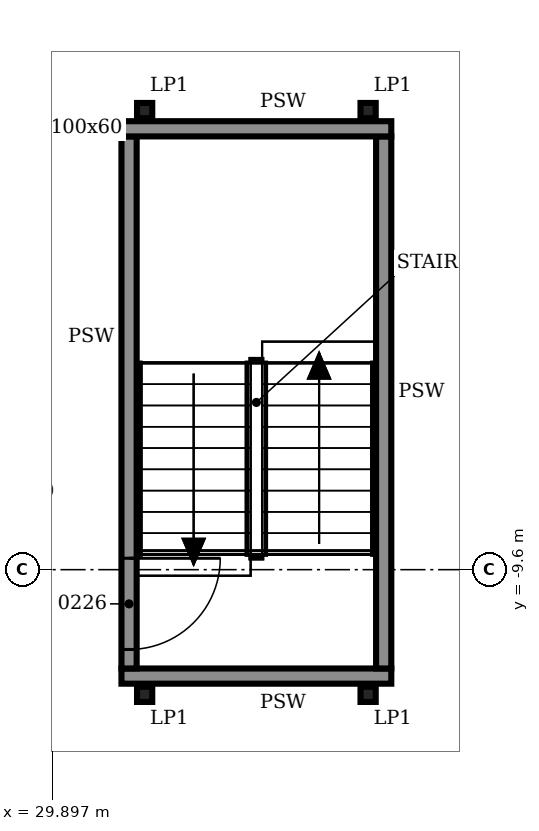
"""IFC4 building model, lengths in metres.
Left out: names, types, materials, properties, quantities, classifications, styles, units other than length and angle.
Written with IfcOpenShell. Run it as: python <this file> out.ifc"""

import sys

from ifc_helpers import new_model, si_unit, direction, frame, frame_2d, origin, origin_2d, place, context, subcontext, project, spatial, rectangle, i_section, extrude, element, fill, save


model = new_model("IFC4")
c1 = context("Model", 3, precision=1e-05, world=origin(), true_north=direction((0.0, 1.0)))
c2 = subcontext(c1, "Body", "Model", "MODEL_VIEW")
j1 = project(units=[si_unit("LENGTHUNIT", "METRE"), si_unit("PLANEANGLEUNIT", "RADIAN")], contexts=[c1])
p1 = place(None, origin())
s1 = spatial("IfcSite", under=j1, at=p1, CompositionType="ELEMENT")
p2 = place(p1, origin())
s2 = spatial("IfcBuilding", under=s1, at=p2, CompositionType="ELEMENT")
p3 = place(p2, frame((0.0, 0.0, 15.0)))
s3 = spatial("IfcBuildingStorey", under=s2, at=p3, CompositionType="ELEMENT", Elevation=15.0)
for number, where, z_axis, x_axis in (
    (1, (31.105, -3.56, 0.0), (0.0, 0.0, 1.0), (1.0, 0.0, 0.0)),
    (2, (34.045, -3.56, 0.0), (0.0, 0.0, 1.0), (1.0, 0.0, 0.0)),
):
    element("IfcColumn", number, at=place(p3, frame(where, z_axis=z_axis, x_axis=x_axis)), inside=s3, PredefinedType="COLUMN", context=c2, shape_type="SweptSolid", body=[
        extrude(i_section(OverallWidth=0.2, OverallDepth=0.2, WebThickness=0.009, FlangeThickness=0.015, FilletRadius=0.018, at=origin_2d()), origin(), (0.0, 0.0, 1.0), 6.0),
    ])
for number, where, z_axis, x_axis in (
    (3, (31.105, -11.24, 0.0), (0.0, 0.0, 1.0), (1.0, 0.0, 0.0)),
    (4, (34.045, -11.24, 0.0), (0.0, 0.0, 1.0), (1.0, 0.0, 0.0)),
):
    element("IfcColumn", number, at=place(p3, frame(where, z_axis=z_axis, x_axis=x_axis)), inside=s3, PredefinedType="COLUMN", context=c2, shape_type="SweptSolid", body=[
        extrude(i_section(OverallWidth=0.2, OverallDepth=0.2, WebThickness=0.009, FlangeThickness=0.015, FilletRadius=0.018, at=origin_2d()), origin(), (0.0, 0.0, 1.0), 2.8),
    ])
p4 = place(p3, frame((30.8, -11.0, 0.0), z_axis=(0.0, 0.0, 1.0), x_axis=(1.0, 0.0, 0.0)))
e5 = element("IfcWall", 5, at=p4, inside=s3, PredefinedType="SOLIDWALL", context=c2, shape_type="SweptSolid", body=[
    extrude(rectangle(XDim=3.55, YDim=0.2, at=frame_2d((1.775, 0.0))), origin(), (0.0, 0.0, 1.0), 5.8),
])
p5 = place(p3, frame((30.9, -10.9, 0.0), z_axis=(0.0, 0.0, 1.0), x_axis=(0.0, 1.0, 0.0)))
e6 = element("IfcWall", 6, at=p5, inside=s3, PredefinedType="SOLIDWALL", context=c2, shape_type="SweptSolid", body=[
    extrude(rectangle(XDim=7.0, YDim=0.2, at=frame_2d((3.5, 0.0))), origin(), (0.0, 0.0, 1.0), 5.8),
])
p6 = place(p5, frame((0.25, 0.0, 0.0)))
e7 = element("IfcOpeningElement", 7, at=p6, cuts=e6, PredefinedType="OPENING", context=c2, shape_type="SweptSolid", body=[
    extrude(rectangle(XDim=1.2, YDim=2.1, at=frame_2d((0.6, 1.05))), frame((0.0, 0.11, 0.0), z_axis=(0.0, -1.0, 0.0), x_axis=(1.0, 0.0, 0.0)), (0.0, 0.0, 1.0), 0.22),
])
p7 = place(p3, frame((34.25, -10.9, 0.0), z_axis=(0.0, 0.0, 1.0), x_axis=(0.0, 1.0, 0.0)))
e8 = element("IfcWall", 8, at=p7, inside=s3, PredefinedType="SOLIDWALL", context=c2, shape_type="SweptSolid", body=[
    extrude(rectangle(XDim=7.0, YDim=0.2, at=frame_2d((3.5, 0.0))), origin(), (0.0, 0.0, 1.0), 5.8),
])
p8 = place(p3, frame((30.8, -3.8, 0.0), z_axis=(0.0, 0.0, 1.0), x_axis=(1.0, 0.0, 0.0)))
e9 = element("IfcWall", 9, at=p8, inside=s3, PredefinedType="SOLIDWALL", context=c2, shape_type="SweptSolid", body=[
    extrude(rectangle(XDim=3.55, YDim=0.2, at=frame_2d((1.775, 0.0))), origin(), (0.0, 0.0, 1.0), 5.8),
])
p9 = place(p6, frame((1.2, 0.0, 0.0), z_axis=(0.0, 0.0, 1.0), x_axis=(-1.0, 0.0, 0.0)))
e10 = element("IfcDoor", 10, at=p9, inside=s3, OperationType="SINGLE_SWING_LEFT", PredefinedType="DOOR", context=c2, shape_type="SweptSolid", body=[
    extrude(rectangle(XDim=1.2, YDim=2.1, at=frame_2d((0.6, 1.05))), frame((0.0, 0.025, 0.0), z_axis=(0.0, -1.0, 0.0), x_axis=(1.0, 0.0, 0.0)), (0.0, 0.0, 1.0), 0.05),
])
fill(e7, e10)
save(model, sys.argv[1])
